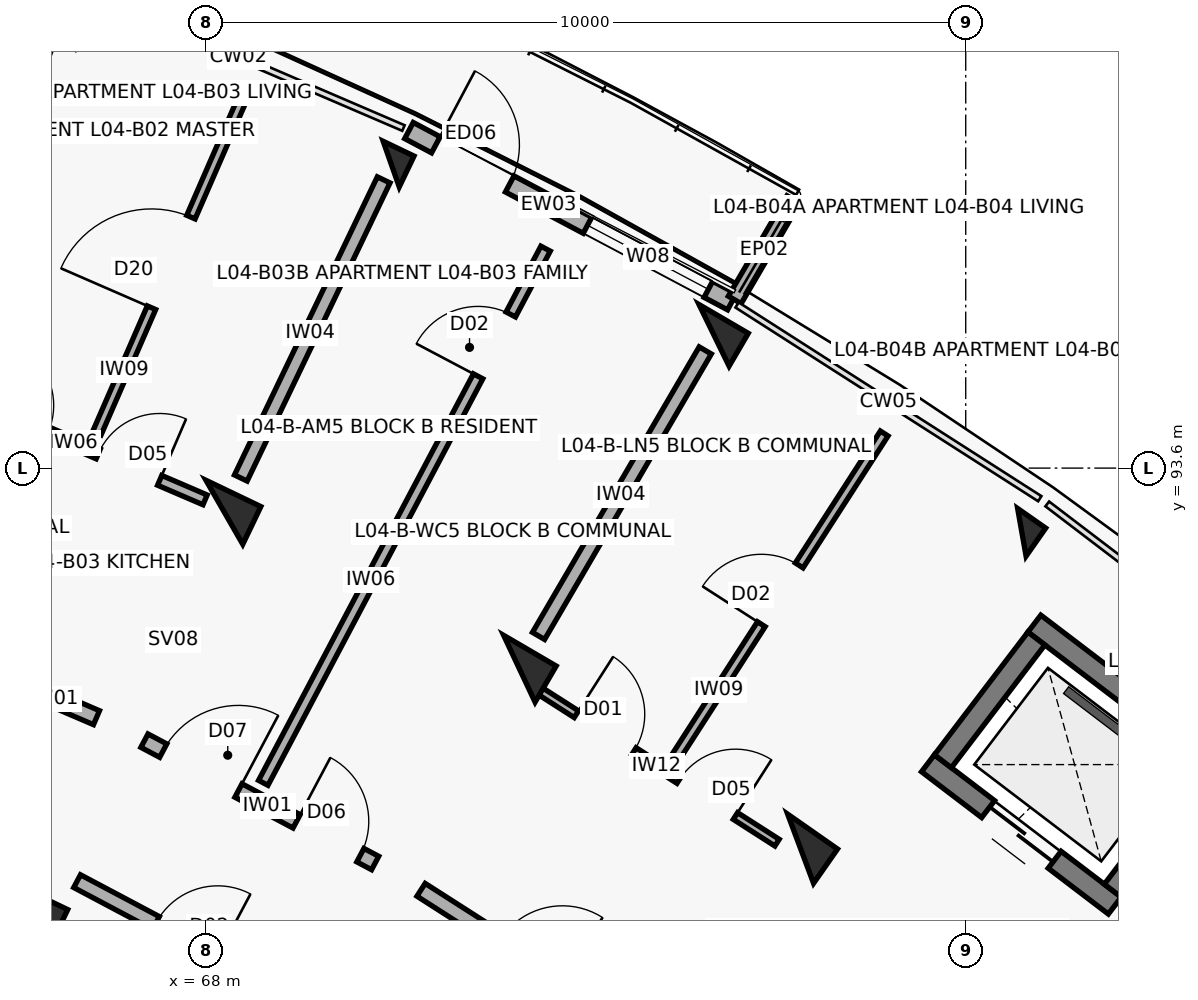
"""IFC4 building model, lengths in metres.
Left out: names, types, materials, properties, quantities, classifications, styles, units other than length and angle.
Written with IfcOpenShell. Run it as: python <this file> out.ifc"""

import sys

from ifc_helpers import new_model, si_unit, direction, frame, frame_2d, origin, origin_2d, place, context, subcontext, project, spatial, rectangle, extrude, element, fill, save


model = new_model("IFC4")
c1 = context("Model", 3, precision=1e-05, world=origin(), true_north=direction((0.0, 1.0)))
c2 = subcontext(c1, "Body", "Model", "MODEL_VIEW")
j1 = project(units=[si_unit("LENGTHUNIT", "METRE"), si_unit("PLANEANGLEUNIT", "RADIAN")], contexts=[c1])
p1 = place(None, origin())
s1 = spatial("IfcSite", under=j1, at=p1, CompositionType="ELEMENT")
p2 = place(p1, origin())
s2 = spatial("IfcBuilding", under=s1, at=p2, CompositionType="ELEMENT")
p3 = place(p2, frame((0.0, 0.0, 14.3)))
s3 = spatial("IfcBuildingStorey", under=s2, at=p3, CompositionType="ELEMENT", Elevation=14.3)
for number, where, z_axis, x_axis in (
    (1, (65.706, 87.716, 0.0), (0.0, 0.0, 1.0), (0.432, 0.902, 0.0)),
    (2, (68.246, 93.019, 0.0), (0.0, 0.0, 1.0), (0.432, 0.902, 0.0)),
):
    element("IfcColumn", number, at=place(p3, frame(where, z_axis=z_axis, x_axis=x_axis)), inside=s3, PredefinedType="COLUMN", context=c2, shape_type="SweptSolid", body=[
        extrude(rectangle(XDim=0.55, YDim=0.8, at=origin_2d()), origin(), (0.0, 0.0, 1.0), 3.1),
    ])
p4 = place(p3, frame((70.441, 97.6, 0.0), z_axis=(0.0, 0.0, 1.0), x_axis=(0.432085748802, 0.901832526405, 0.0)))
e3 = element("IfcColumn", 3, at=p4, inside=s3, PredefinedType="COLUMN", context=c2, shape_type="SweptSolid", body=[
    extrude(rectangle(XDim=0.45, YDim=0.45, at=origin_2d()), origin(), (0.0, 0.0, 1.0), 3.1),
])
p5 = place(p3, frame((72.127, 90.96, 0.0), z_axis=(0.0, 0.0, 1.0), x_axis=(0.504226211181, 0.863571611366, 0.0)))
e4 = element("IfcColumn", 4, at=p5, inside=s3, PredefinedType="COLUMN", context=c2, shape_type="SweptSolid", body=[
    extrude(rectangle(XDim=0.55, YDim=0.8, at=origin_2d()), origin(), (0.0, 0.0, 1.0), 3.1),
])
p6 = place(p3, frame((74.689, 95.347, 0.0), z_axis=(0.0, 0.0, 1.0), x_axis=(0.504226211181, 0.863571611366, 0.0)))
e5 = element("IfcColumn", 5, at=p6, inside=s3, PredefinedType="COLUMN", context=c2, shape_type="SweptSolid", body=[
    extrude(rectangle(XDim=0.5, YDim=0.75, at=origin_2d()), origin(), (0.0, 0.0, 1.0), 3.1),
])
p7 = place(p3, frame((75.828, 88.592, 0.0), z_axis=(0.0, 0.0, 1.0), x_axis=(0.573004420611, 0.819552276527, 0.0)))
e6 = element("IfcColumn", 6, at=p7, inside=s3, PredefinedType="COLUMN", context=c2, shape_type="SweptSolid", body=[
    extrude(rectangle(XDim=0.55, YDim=0.8, at=origin_2d()), origin(), (0.0, 0.0, 1.0), 3.1),
])
p8 = place(p3, frame((78.739, 92.755, 0.0), z_axis=(0.0, 0.0, 1.0), x_axis=(0.573004420611, 0.819552276527, 0.0)))
e7 = element("IfcColumn", 7, at=p8, inside=s3, PredefinedType="COLUMN", context=c2, shape_type="SweptSolid", body=[
    extrude(rectangle(XDim=0.45, YDim=0.45, at=origin_2d()), origin(), (0.0, 0.0, 1.0), 3.1),
])
p9 = place(p3, frame((70.675, 98.042, 0.0), z_axis=(0.0, 0.0, 1.0), x_axis=(0.883448093208, -0.468529045639, 0.0)))
e8 = element("IfcWall", 8, at=p9, inside=s3, PredefinedType="SOLIDWALL", context=c2, shape_type="SweptSolid", body=[
    extrude(rectangle(XDim=4.809, YDim=0.24, at=frame_2d((2.405, 0.0))), origin(), (0.0, 0.0, 1.0), 2.25),
])
p10 = place(p9, frame((0.4, 0.0, 0.0)))
e9 = element("IfcOpeningElement", 9, at=p10, cuts=e8, PredefinedType="OPENING", context=c2, shape_type="SweptSolid", body=[
    extrude(rectangle(XDim=1.1, YDim=2.15, at=frame_2d((0.55, 1.075))), frame((0.0, 0.13, 0.0), z_axis=(0.0, -1.0, 0.0), x_axis=(1.0, 0.0, 0.0)), (0.0, 0.0, 1.0), 0.26),
])
p11 = place(p9, frame((2.659, 0.0, 0.35)))
e10 = element("IfcOpeningElement", 10, at=p11, cuts=e8, PredefinedType="OPENING", context=c2, shape_type="SweptSolid", body=[
    extrude(rectangle(XDim=1.8, YDim=1.65, at=frame_2d((0.9, 0.825))), frame((0.0, 0.13, 0.0), z_axis=(0.0, -1.0, 0.0), x_axis=(1.0, 0.0, 0.0)), (0.0, 0.0, 1.0), 0.26),
])
p12 = place(p3, frame((74.961, 95.813, 0.0), z_axis=(0.0, 0.0, 1.0), x_axis=(0.504228145431, 0.863570481985, 0.0)))
e11 = element("IfcWall", 11, at=p12, inside=s3, PredefinedType="PARAPET", context=c2, shape_type="SweptSolid", body=[
    extrude(rectangle(XDim=1.53, YDim=0.195, at=frame_2d((0.765, 0.0))), origin(), (0.0, 0.0, 1.0), 2.25),
])
p13 = place(p3, frame((77.655, 83.461, 0.0), z_axis=(0.0, 0.0, 1.0), x_axis=(0.668868253964, 0.743380964808, 0.0)))
e12 = element("IfcWall", 12, at=p13, inside=s3, PredefinedType="SHEAR", context=c2, shape_type="SweptSolid", body=[
    extrude(rectangle(XDim=7.69, YDim=0.3, at=frame_2d((3.845, 0.0))), origin(), (0.0, 0.0, 1.0), 3.1),
])
p14 = place(p3, frame((79.961, 87.844, 0.0), z_axis=(0.0, 0.0, 1.0), x_axis=(-0.795464365424, 0.606000365793, 0.0)))
e13 = element("IfcWall", 13, at=p14, inside=s3, PredefinedType="SHEAR", context=c2, shape_type="SweptSolid", body=[
    extrude(rectangle(XDim=3.09, YDim=0.28, at=frame_2d((1.545, 0.0))), origin(), (0.0, 0.0, 1.0), 3.1),
])
p15 = place(p14, frame((0.995, 0.0, 0.0)))
e14 = element("IfcOpeningElement", 14, at=p15, cuts=e13, PredefinedType="OPENING", context=c2, shape_type="SweptSolid", body=[
    extrude(rectangle(XDim=1.1, YDim=2.15, at=frame_2d((0.55, 1.075))), frame((0.0, 0.15, 0.0), z_axis=(0.0, -1.0, 0.0), x_axis=(1.0, 0.0, 0.0)), (0.0, 0.0, 1.0), 0.3),
])
p16 = place(p3, frame((81.361, 89.681, 0.0), z_axis=(0.0, 0.0, 1.0), x_axis=(-0.795502452183, 0.605950368076, 0.0)))
e15 = element("IfcWall", 15, at=p16, inside=s3, PredefinedType="SHEAR", context=c2, shape_type="SweptSolid", body=[
    extrude(rectangle(XDim=3.09, YDim=0.28, at=frame_2d((1.545, 0.0))), origin(), (0.0, 0.0, 1.0), 3.1),
])
for number, where, z_axis, x_axis in (
    (16, (79.935, 88.04, 0.0), (0.0, 0.0, 1.0), (0.606, 0.795, 0.0)),
    (17, (77.699, 89.743, 0.0), (0.0, 0.0, 1.0), (0.606, 0.795, 0.0)),
):
    element("IfcWall", number, at=place(p3, frame(where, z_axis=z_axis, x_axis=x_axis)), inside=s3, PredefinedType="SHEAR", context=c2, shape_type="SweptSolid", body=[
        extrude(rectangle(XDim=2.03, YDim=0.28, at=frame_2d((1.015, 0.0))), origin(), (0.0, 0.0, 1.0), 3.1),
    ])
p17 = place(p3, frame((63.407, 91.673, 0.0), z_axis=(0.0, 0.0, 1.0), x_axis=(0.918718172399, -0.394913813008, 0.0)))
e18 = element("IfcWall", 18, at=p17, inside=s3, PredefinedType="SOLIDWALL", context=c2, shape_type="SweptSolid", body=[
    extrude(rectangle(XDim=3.436, YDim=0.2, at=frame_2d((1.718, 0.0))), origin(), (0.0, 0.0, 1.0), 2.08),
])
p18 = place(p17, frame((1.228, 0.0, 0.0)))
e19 = element("IfcOpeningElement", 19, at=p18, cuts=e18, PredefinedType="OPENING", context=c2, shape_type="SweptSolid", body=[
    extrude(rectangle(XDim=0.98, YDim=2.15, at=frame_2d((0.49, 1.075))), frame((0.0, 0.11, 0.0), z_axis=(0.0, -1.0, 0.0), x_axis=(1.0, 0.0, 0.0)), (0.0, 0.0, 1.0), 0.22),
])
p19 = place(p3, frame((64.503, 94.682, 0.0), z_axis=(0.0, 0.0, 1.0), x_axis=(0.918732171064, -0.394881245253, 0.0)))
e20 = element("IfcWall", 20, at=p19, inside=s3, PredefinedType="PARTITIONING", context=c2, shape_type="SweptSolid", body=[
    extrude(rectangle(XDim=3.797, YDim=0.14, at=frame_2d((1.899, 0.0))), origin(), (0.0, 0.0, 1.0), 2.08),
])
p20 = place(p19, frame((0.65, 0.0, 0.0)))
e21 = element("IfcOpeningElement", 21, at=p20, cuts=e20, PredefinedType="OPENING", context=c2, shape_type="SweptSolid", body=[
    extrude(rectangle(XDim=0.9, YDim=2.1, at=frame_2d((0.45, 1.05))), frame((0.0, 0.08, 0.0), z_axis=(0.0, -1.0, 0.0), x_axis=(1.0, 0.0, 0.0)), (0.0, 0.0, 1.0), 0.16),
])
p21 = place(p19, frame((2.267, 0.0, 0.0)))
e22 = element("IfcOpeningElement", 22, at=p21, cuts=e20, PredefinedType="OPENING", context=c2, shape_type="SweptSolid", body=[
    extrude(rectangle(XDim=0.88, YDim=2.1, at=frame_2d((0.44, 1.05))), frame((0.0, 0.08, 0.0), z_axis=(0.0, -1.0, 0.0), x_axis=(1.0, 0.0, 0.0)), (0.0, 0.0, 1.0), 0.16),
])
p22 = place(p3, frame((66.569, 94.06, 0.0), z_axis=(0.0, 0.0, 1.0), x_axis=(0.399048563147, 0.916929792433, 0.0)))
e23 = element("IfcWall", 23, at=p22, inside=s3, PredefinedType="PARTITIONING", context=c2, shape_type="SweptSolid", body=[
    extrude(rectangle(XDim=4.9, YDim=0.12, at=frame_2d((2.45, 0.0))), origin(), (0.0, 0.0, 1.0), 2.08),
])
p23 = place(p22, frame((1.8, 0.0, 0.0)))
e24 = element("IfcOpeningElement", 24, at=p23, cuts=e23, PredefinedType="OPENING", context=c2, shape_type="SweptSolid", body=[
    extrude(rectangle(XDim=1.3, YDim=2.1, at=frame_2d((0.65, 1.05))), frame((0.0, 0.07, 0.0), z_axis=(0.0, -1.0, 0.0), x_axis=(1.0, 0.0, 0.0)), (0.0, 0.0, 1.0), 0.14),
])
p24 = place(p3, frame((64.389, 95.22, 0.0), z_axis=(0.0, 0.0, 1.0), x_axis=(0.357064016205, 0.934079915388, 0.0)))
e25 = element("IfcWall", 25, at=p24, inside=s3, PredefinedType="SOLIDWALL", context=c2, shape_type="SweptSolid", body=[
    extrude(rectangle(XDim=4.35, YDim=0.185, at=frame_2d((2.175, 0.0))), origin(), (0.0, 0.0, 1.0), 2.08),
])
p25 = place(p3, frame((67.194, 90.014, 0.0), z_axis=(0.0, 0.0, 1.0), x_axis=(0.883410853063, -0.468599258099, 0.0)))
e26 = element("IfcWall", 26, at=p25, inside=s3, PredefinedType="SOLIDWALL", context=c2, shape_type="SweptSolid", body=[
    extrude(rectangle(XDim=3.436, YDim=0.2, at=frame_2d((1.718, 0.0))), origin(), (0.0, 0.0, 1.0), 2.08),
])
p26 = place(p25, frame((0.28, 0.0, 0.0)))
e27 = element("IfcOpeningElement", 27, at=p26, cuts=e26, PredefinedType="OPENING", context=c2, shape_type="SweptSolid", body=[
    extrude(rectangle(XDim=1.12, YDim=2.15, at=frame_2d((0.56, 1.075))), frame((0.0, 0.11, 0.0), z_axis=(0.0, -1.0, 0.0), x_axis=(1.0, 0.0, 0.0)), (0.0, 0.0, 1.0), 0.22),
])
p27 = place(p25, frame((2.266, 0.0, 0.0)))
e28 = element("IfcOpeningElement", 28, at=p27, cuts=e26, PredefinedType="OPENING", context=c2, shape_type="SweptSolid", body=[
    extrude(rectangle(XDim=0.95, YDim=2.1, at=frame_2d((0.475, 1.05))), frame((0.0, 0.11, 0.0), z_axis=(0.0, -1.0, 0.0), x_axis=(1.0, 0.0, 0.0)), (0.0, 0.0, 1.0), 0.22),
])
p28 = place(p3, frame((66.309, 88.165, 0.0), z_axis=(0.0, 0.0, 1.0), x_axis=(0.883444301944, -0.468536194293, 0.0)))
e29 = element("IfcWall", 29, at=p28, inside=s3, PredefinedType="SOLIDWALL", context=c2, shape_type="SweptSolid", body=[
    extrude(rectangle(XDim=3.269, YDim=0.19, at=frame_2d((1.634, 0.0))), origin(), (0.0, 0.0, 1.0), 2.08),
])
p29 = place(p28, frame((1.174, 0.0, 0.0)))
e30 = element("IfcOpeningElement", 30, at=p29, cuts=e29, PredefinedType="OPENING", context=c2, shape_type="SweptSolid", body=[
    extrude(rectangle(XDim=0.92, YDim=2.1, at=frame_2d((0.46, 1.05))), frame((0.0, 0.105, 0.0), z_axis=(0.0, -1.0, 0.0), x_axis=(1.0, 0.0, 0.0)), (0.0, 0.0, 1.0), 0.21),
])
p30 = place(p3, frame((68.758, 89.459, 0.0), z_axis=(0.0, 0.0, 1.0), x_axis=(0.467208910392, 0.884146952746, 0.0)))
e31 = element("IfcWall", 31, at=p30, inside=s3, PredefinedType="PARTITIONING", context=c2, shape_type="SweptSolid", body=[
    extrude(rectangle(XDim=7.95, YDim=0.14, at=frame_2d((3.975, 0.0))), origin(), (0.0, 0.0, 1.0), 2.08),
])
p31 = place(p30, frame((6.05, 0.0, 0.0)))
e32 = element("IfcOpeningElement", 32, at=p31, cuts=e31, PredefinedType="OPENING", context=c2, shape_type="SweptSolid", body=[
    extrude(rectangle(XDim=0.92, YDim=2.1, at=frame_2d((0.46, 1.05))), frame((0.0, 0.08, 0.0), z_axis=(0.0, -1.0, 0.0), x_axis=(1.0, 0.0, 0.0)), (0.0, 0.0, 1.0), 0.16),
])
p32 = place(p3, frame((68.462, 93.469, 0.0), z_axis=(0.0, 0.0, 1.0), x_axis=(0.432086898897, 0.901831975371, 0.0)))
e33 = element("IfcWall", 33, at=p32, inside=s3, PredefinedType="SOLIDWALL", context=c2, shape_type="SweptSolid", body=[
    extrude(rectangle(XDim=4.35, YDim=0.185, at=frame_2d((2.175, 0.0))), origin(), (0.0, 0.0, 1.0), 2.08),
])
p33 = place(p3, frame((70.834, 88.051, 0.0), z_axis=(0.0, 0.0, 1.0), x_axis=(0.842257205985, -0.539075874963, 0.0)))
e34 = element("IfcWall", 34, at=p33, inside=s3, PredefinedType="SOLIDWALL", context=c2, shape_type="SweptSolid", body=[
    extrude(rectangle(XDim=3.436, YDim=0.2, at=frame_2d((1.718, 0.0))), origin(), (0.0, 0.0, 1.0), 2.08),
])
p34 = place(p33, frame((1.228, 0.0, 0.0)))
e35 = element("IfcOpeningElement", 35, at=p34, cuts=e34, PredefinedType="OPENING", context=c2, shape_type="SweptSolid", body=[
    extrude(rectangle(XDim=0.98, YDim=2.15, at=frame_2d((0.49, 1.075))), frame((0.0, 0.11, 0.0), z_axis=(0.0, -1.0, 0.0), x_axis=(1.0, 0.0, 0.0)), (0.0, 0.0, 1.0), 0.22),
])
p35 = place(p3, frame((72.33, 90.712, 0.0), z_axis=(0.0, 0.0, 1.0), x_axis=(0.842245628842, -0.539093962771, 0.0)))
e36 = element("IfcWall", 36, at=p35, inside=s3, PredefinedType="PARTITIONING", context=c2, shape_type="SweptSolid", body=[
    extrude(rectangle(XDim=3.785, YDim=0.105, at=frame_2d((1.893, 0.0))), origin(), (0.0, 0.0, 1.0), 2.08),
])
p36 = place(p35, frame((0.65, 0.0, 0.0)))
e37 = element("IfcOpeningElement", 37, at=p36, cuts=e36, PredefinedType="OPENING", context=c2, shape_type="SweptSolid", body=[
    extrude(rectangle(XDim=0.9, YDim=2.1, at=frame_2d((0.45, 1.05))), frame((0.0, 0.062, 0.0), z_axis=(0.0, -1.0, 0.0), x_axis=(1.0, 0.0, 0.0)), (0.0, 0.0, 1.0), 0.125),
])
p37 = place(p35, frame((2.255, 0.0, 0.0)))
e38 = element("IfcOpeningElement", 38, at=p37, cuts=e36, PredefinedType="OPENING", context=c2, shape_type="SweptSolid", body=[
    extrude(rectangle(XDim=0.88, YDim=2.1, at=frame_2d((0.44, 1.05))), frame((0.0, 0.062, 0.0), z_axis=(0.0, -1.0, 0.0), x_axis=(1.0, 0.0, 0.0)), (0.0, 0.0, 1.0), 0.125),
])
p38 = place(p3, frame((74.192, 89.81, 0.0), z_axis=(0.0, 0.0, 1.0), x_axis=(0.541612517702, 0.840628265447, 0.0)))
e39 = element("IfcWall", 39, at=p38, inside=s3, PredefinedType="PARTITIONING", context=c2, shape_type="SweptSolid", body=[
    extrude(rectangle(XDim=5.05, YDim=0.12, at=frame_2d((2.525, 0.0))), origin(), (0.0, 0.0, 1.0), 2.08),
])
p39 = place(p38, frame((2.065, 0.0, 0.0)))
e40 = element("IfcOpeningElement", 40, at=p39, cuts=e39, PredefinedType="OPENING", context=c2, shape_type="SweptSolid", body=[
    extrude(rectangle(XDim=0.92, YDim=2.1, at=frame_2d((0.46, 1.05))), frame((0.0, 0.07, 0.0), z_axis=(0.0, -1.0, 0.0), x_axis=(1.0, 0.0, 0.0)), (0.0, 0.0, 1.0), 0.14),
])
p40 = place(p3, frame((72.379, 91.392, 0.0), z_axis=(0.0, 0.0, 1.0), x_axis=(0.504216452091, 0.863577309475, 0.0)))
e41 = element("IfcWall", 41, at=p40, inside=s3, PredefinedType="SOLIDWALL", context=c2, shape_type="SweptSolid", body=[
    extrude(rectangle(XDim=4.35, YDim=0.185, at=frame_2d((2.175, 0.0))), origin(), (0.0, 0.0, 1.0), 2.08),
])
p41 = place(p10, origin())
e42 = element("IfcDoor", 42, at=p41, inside=s3, OperationType="SINGLE_SWING_LEFT", PredefinedType="DOOR", context=c2, shape_type="SweptSolid", body=[
    extrude(rectangle(XDim=1.1, YDim=2.15, at=frame_2d((0.55, 1.075))), frame((0.0, 0.025, 0.0), z_axis=(0.0, -1.0, 0.0), x_axis=(1.0, 0.0, 0.0)), (0.0, 0.0, 1.0), 0.05),
])
fill(e9, e42)
p42 = place(p11, origin())
e43 = element("IfcWindow", 43, at=p42, inside=s3, PartitioningType="TRIPLE_PANEL_VERTICAL", PredefinedType="WINDOW", context=c2, shape_type="SweptSolid", body=[
    extrude(rectangle(XDim=1.8, YDim=1.65, at=frame_2d((0.9, 0.825))), frame((0.0, 0.03, 0.0), z_axis=(0.0, -1.0, 0.0), x_axis=(1.0, 0.0, 0.0)), (0.0, 0.0, 1.0), 0.06),
])
fill(e10, e43)
p43 = place(p15, origin())
e44 = element("IfcDoor", 44, at=p43, inside=s3, OperationType="DOUBLE_DOOR_SLIDING", PredefinedType="DOOR", context=c2, shape_type="SweptSolid", body=[
    extrude(rectangle(XDim=1.1, YDim=2.15, at=frame_2d((0.55, 1.075))), frame((0.0, 0.025, 0.0), z_axis=(0.0, -1.0, 0.0), x_axis=(1.0, 0.0, 0.0)), (0.0, 0.0, 1.0), 0.05),
])
fill(e14, e44)
p44 = place(p21, origin())
e45 = element("IfcDoor", 45, at=p44, inside=s3, OperationType="SINGLE_SWING_RIGHT", PredefinedType="DOOR", context=c2, shape_type="SweptSolid", body=[
    extrude(rectangle(XDim=0.88, YDim=2.1, at=frame_2d((0.44, 1.05))), frame((0.0, 0.025, 0.0), z_axis=(0.0, -1.0, 0.0), x_axis=(1.0, 0.0, 0.0)), (0.0, 0.0, 1.0), 0.05),
])
fill(e22, e45)
p45 = place(p23, origin())
e46 = element("IfcDoor", 46, at=p45, inside=s3, OperationType="SINGLE_SWING_LEFT", PredefinedType="DOOR", context=c2, shape_type="SweptSolid", body=[
    extrude(rectangle(XDim=1.3, YDim=2.1, at=frame_2d((0.65, 1.05))), frame((0.0, 0.025, 0.0), z_axis=(0.0, -1.0, 0.0), x_axis=(1.0, 0.0, 0.0)), (0.0, 0.0, 1.0), 0.05),
])
fill(e24, e46)
p46 = place(p26, origin())
e47 = element("IfcDoor", 47, at=p46, inside=s3, OperationType="SINGLE_SWING_RIGHT", PredefinedType="DOOR", context=c2, shape_type="SweptSolid", body=[
    extrude(rectangle(XDim=1.12, YDim=2.15, at=frame_2d((0.56, 1.075))), frame((0.0, 0.025, 0.0), z_axis=(0.0, -1.0, 0.0), x_axis=(1.0, 0.0, 0.0)), (0.0, 0.0, 1.0), 0.05),
])
fill(e27, e47)
p47 = place(p27, origin())
e48 = element("IfcDoor", 48, at=p47, inside=s3, OperationType="SINGLE_SWING_LEFT", PredefinedType="DOOR", context=c2, shape_type="SweptSolid", body=[
    extrude(rectangle(XDim=0.95, YDim=2.1, at=frame_2d((0.475, 1.05))), frame((0.0, 0.025, 0.0), z_axis=(0.0, -1.0, 0.0), x_axis=(1.0, 0.0, 0.0)), (0.0, 0.0, 1.0), 0.05),
])
fill(e28, e48)
p48 = place(p31, origin())
e49 = element("IfcDoor", 49, at=p48, inside=s3, OperationType="SINGLE_SWING_LEFT", PredefinedType="DOOR", context=c2, shape_type="SweptSolid", body=[
    extrude(rectangle(XDim=0.92, YDim=2.1, at=frame_2d((0.46, 1.05))), frame((0.0, 0.025, 0.0), z_axis=(0.0, -1.0, 0.0), x_axis=(1.0, 0.0, 0.0)), (0.0, 0.0, 1.0), 0.05),
])
fill(e32, e49)
p49 = place(p36, origin())
e50 = element("IfcDoor", 50, at=p49, inside=s3, OperationType="SINGLE_SWING_LEFT", PredefinedType="DOOR", context=c2, shape_type="SweptSolid", body=[
    extrude(rectangle(XDim=0.9, YDim=2.1, at=frame_2d((0.45, 1.05))), frame((0.0, 0.025, 0.0), z_axis=(0.0, -1.0, 0.0), x_axis=(1.0, 0.0, 0.0)), (0.0, 0.0, 1.0), 0.05),
])
fill(e37, e50)
p50 = place(p37, origin())
e51 = element("IfcDoor", 51, at=p50, inside=s3, OperationType="SINGLE_SWING_RIGHT", PredefinedType="DOOR", context=c2, shape_type="SweptSolid", body=[
    extrude(rectangle(XDim=0.88, YDim=2.1, at=frame_2d((0.44, 1.05))), frame((0.0, 0.025, 0.0), z_axis=(0.0, -1.0, 0.0), x_axis=(1.0, 0.0, 0.0)), (0.0, 0.0, 1.0), 0.05),
])
fill(e38, e51)
p51 = place(p39, origin())
e52 = element("IfcDoor", 52, at=p51, inside=s3, OperationType="SINGLE_SWING_LEFT", PredefinedType="DOOR", context=c2, shape_type="SweptSolid", body=[
    extrude(rectangle(XDim=0.92, YDim=2.1, at=frame_2d((0.46, 1.05))), frame((0.0, 0.025, 0.0), z_axis=(0.0, -1.0, 0.0), x_axis=(1.0, 0.0, 0.0)), (0.0, 0.0, 1.0), 0.05),
])
fill(e40, e52)
save(model, sys.argv[1])
